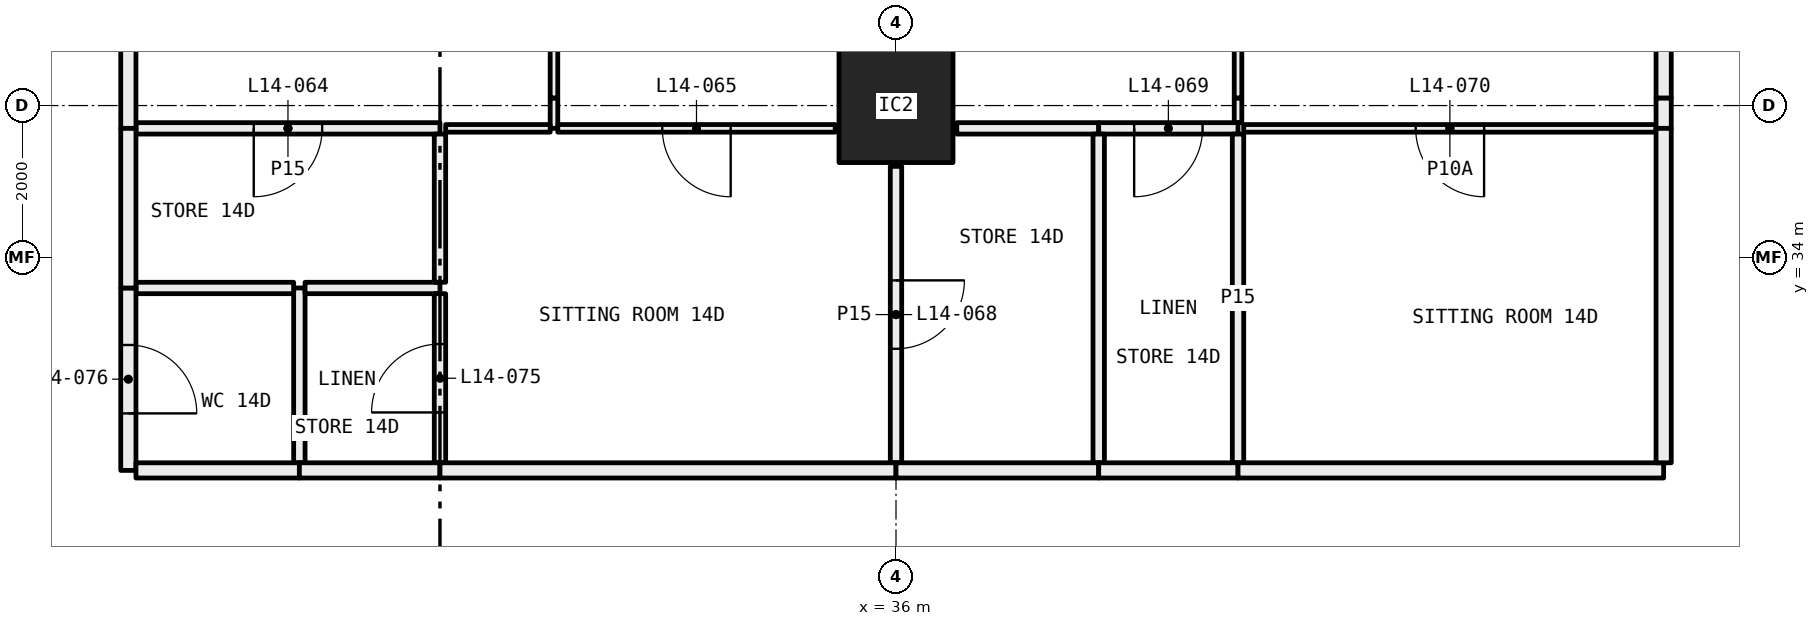
"""IFC4 building model, lengths in metres.
Left out: names, types, materials, properties, quantities, classifications, styles, units other than length and angle.
Written with IfcOpenShell. Run it as: python <this file> out.ifc"""

import sys

from ifc_helpers import new_model, si_unit, direction, frame, frame_2d, origin, origin_2d, place, context, subcontext, project, spatial, rectangle, hollow_rectangle, extrude, element, fill, save


model = new_model("IFC4")
c1 = context("Model", 3, precision=1e-05, world=origin(), true_north=direction((0.0, 1.0)))
c2 = subcontext(c1, "Body", "Model", "MODEL_VIEW")
j1 = project(units=[si_unit("LENGTHUNIT", "METRE"), si_unit("PLANEANGLEUNIT", "RADIAN")], contexts=[c1])
p1 = place(None, origin())
s1 = spatial("IfcSite", under=j1, at=p1, CompositionType="ELEMENT")
p2 = place(p1, origin())
s2 = spatial("IfcBuilding", under=s1, at=p2, CompositionType="ELEMENT")
p3 = place(p2, frame((0.0, 0.0, 61.05)))
s3 = spatial("IfcBuildingStorey", under=s2, at=p3, CompositionType="ELEMENT", Elevation=61.05)
p4 = place(p3, frame((36.0, 36.0, 0.0), z_axis=(0.0, 0.0, 1.0), x_axis=(1.0, 0.0, 0.0)))
e1 = element("IfcColumn", 1, at=p4, inside=s3, PredefinedType="COLUMN", context=c2, shape_type="SweptSolid", body=[
    extrude(hollow_rectangle(XDim=1.5, YDim=1.5, WallThickness=0.065, at=origin_2d()), origin(), (0.0, 0.0, 1.0), 3.05),
])
p5 = place(p3, frame((31.5, 35.7, 0.0), z_axis=(0.0, 0.0, 1.0), x_axis=(0.0, 1.0, 0.0)))
e2 = element("IfcWall", 2, at=p5, inside=s3, PredefinedType="PARTITIONING", context=c2, shape_type="SweptSolid", body=[
    extrude(rectangle(XDim=0.4, YDim=0.1, at=frame_2d((0.2, 0.0))), origin(), (0.0, 0.0, 1.0), 2.45),
])
p6 = place(p3, frame((31.5, 36.1, 0.0), z_axis=(0.0, 0.0, 1.0), x_axis=(0.0, 1.0, 0.0)))
e3 = element("IfcWall", 3, at=p6, inside=s3, PredefinedType="PARTITIONING", context=c2, shape_type="SweptSolid", body=[
    extrude(rectangle(XDim=5.825, YDim=0.1, at=frame_2d((2.913, 0.0))), origin(), (0.0, 0.0, 1.0), 3.05),
])
p7 = place(p6, frame((2.462, 0.0, 0.0)))
e4 = element("IfcOpeningElement", 4, at=p7, cuts=e3, PredefinedType="OPENING", context=c2, shape_type="SweptSolid", body=[
    extrude(rectangle(XDim=0.9, YDim=2.1, at=frame_2d((0.45, 1.05))), frame((0.0, 0.06, 0.0), z_axis=(0.0, -1.0, 0.0), x_axis=(1.0, 0.0, 0.0)), (0.0, 0.0, 1.0), 0.12),
])
p8 = place(p3, frame((26.0, 35.7, 0.0), z_axis=(0.0, 0.0, 1.0), x_axis=(1.0, 0.0, 0.0)))
e5 = element("IfcWall", 5, at=p8, inside=s3, PredefinedType="PARTITIONING", context=c2, shape_type="SweptSolid", body=[
    extrude(rectangle(XDim=4.0, YDim=0.15, at=frame_2d((2.0, 0.0))), origin(), (0.0, 0.0, 1.0), 3.05),
])
p9 = place(p8, frame((1.55, 0.0, 0.0)))
e6 = element("IfcOpeningElement", 6, at=p9, cuts=e5, PredefinedType="OPENING", context=c2, shape_type="SweptSolid", body=[
    extrude(rectangle(XDim=0.9, YDim=2.1, at=frame_2d((0.45, 1.05))), frame((0.0, 0.085, 0.0), z_axis=(0.0, -1.0, 0.0), x_axis=(1.0, 0.0, 0.0)), (0.0, 0.0, 1.0), 0.17),
])
p10 = place(p3, frame((30.075, 35.7, 0.0), z_axis=(0.0, 0.0, 1.0), x_axis=(1.0, 0.0, 0.0)))
e7 = element("IfcWall", 7, at=p10, inside=s3, PredefinedType="PARTITIONING", context=c2, shape_type="SweptSolid", body=[
    extrude(rectangle(XDim=1.375, YDim=0.1, at=frame_2d((0.688, 0.0))), origin(), (0.0, 0.0, 1.0), 3.05),
])
p11 = place(p3, frame((25.9, 41.9, 0.0), z_axis=(0.0, 0.0, 1.0), x_axis=(0.0, -1.0, 0.0)))
e8 = element("IfcWall", 8, at=p11, inside=s3, PredefinedType="PARTITIONING", context=c2, shape_type="SweptSolid", body=[
    extrude(rectangle(XDim=6.2, YDim=0.2, at=frame_2d((3.1, 0.0))), origin(), (0.0, 0.0, 1.0), 2.45),
])
p12 = place(p3, frame((31.55, 35.7, 0.0), z_axis=(0.0, 0.0, 1.0), x_axis=(1.0, 0.0, 0.0)))
e9 = element("IfcWall", 9, at=p12, inside=s3, PredefinedType="PARTITIONING", context=c2, shape_type="SweptSolid", body=[
    extrude(rectangle(XDim=3.65, YDim=0.1, at=frame_2d((1.825, 0.0))), origin(), (0.0, 0.0, 1.0), 3.05),
])
p13 = place(p12, frame((1.375, 0.0, 0.0)))
e10 = element("IfcOpeningElement", 10, at=p13, cuts=e9, PredefinedType="OPENING", context=c2, shape_type="SweptSolid", body=[
    extrude(rectangle(XDim=0.9, YDim=2.1, at=frame_2d((0.45, 1.05))), frame((0.0, 0.06, 0.0), z_axis=(0.0, -1.0, 0.0), x_axis=(1.0, 0.0, 0.0)), (0.0, 0.0, 1.0), 0.12),
])
p14 = place(p3, frame((28.15, 31.3, 0.0), z_axis=(0.0, 0.0, 1.0), x_axis=(0.0, 1.0, 0.0)))
e11 = element("IfcWall", 11, at=p14, inside=s3, PredefinedType="PARTITIONING", context=c2, shape_type="SweptSolid", body=[
    extrude(rectangle(XDim=2.3, YDim=0.15, at=frame_2d((1.15, 0.0))), origin(), (0.0, 0.0, 1.0), 3.05),
])
p15 = place(p3, frame((28.075, 33.6, 0.0), z_axis=(0.0, 0.0, 1.0), x_axis=(-1.0, 0.0, 0.0)))
e12 = element("IfcWall", 12, at=p15, inside=s3, PredefinedType="PARTITIONING", context=c2, shape_type="SweptSolid", body=[
    extrude(rectangle(XDim=2.075, YDim=0.15, at=frame_2d((1.038, 0.0))), origin(), (0.0, 0.0, 1.0), 3.05),
])
p16 = place(p3, frame((25.9, 33.6, 0.0), z_axis=(0.0, 0.0, 1.0), x_axis=(0.0, -1.0, 0.0)))
e13 = element("IfcWall", 13, at=p16, inside=s3, PredefinedType="PARTITIONING", context=c2, shape_type="SweptSolid", body=[
    extrude(rectangle(XDim=2.4, YDim=0.2, at=frame_2d((1.2, 0.0))), origin(), (0.0, 0.0, 1.0), 3.05),
])
p17 = place(p16, frame((0.75, 0.0, 0.0)))
e14 = element("IfcOpeningElement", 14, at=p17, cuts=e13, PredefinedType="OPENING", context=c2, shape_type="SweptSolid", body=[
    extrude(rectangle(XDim=0.9, YDim=2.1, at=frame_2d((0.45, 1.05))), frame((0.0, 0.11, 0.0), z_axis=(0.0, -1.0, 0.0), x_axis=(1.0, 0.0, 0.0)), (0.0, 0.0, 1.0), 0.22),
])
p18 = place(p3, frame((26.0, 31.2, 0.0), z_axis=(0.0, 0.0, 1.0), x_axis=(1.0, 0.0, 0.0)))
e15 = element("IfcWall", 15, at=p18, inside=s3, PredefinedType="PARTITIONING", context=c2, shape_type="SweptSolid", body=[
    extrude(rectangle(XDim=2.15, YDim=0.2, at=frame_2d((1.075, 0.0))), origin(), (0.0, 0.0, 1.0), 3.05),
])
p19 = place(p3, frame((30.0, 33.6, 0.0), z_axis=(0.0, 0.0, 1.0), x_axis=(-1.0, 0.0, 0.0)))
e16 = element("IfcWall", 16, at=p19, inside=s3, PredefinedType="PARTITIONING", context=c2, shape_type="SweptSolid", body=[
    extrude(rectangle(XDim=1.775, YDim=0.15, at=frame_2d((0.887, 0.0))), origin(), (0.0, 0.0, 1.0), 3.05),
])
p20 = place(p3, frame((30.0, 31.3, 0.0), z_axis=(0.0, 0.0, 1.0), x_axis=(0.0, 1.0, 0.0)))
e17 = element("IfcWall", 17, at=p20, inside=s3, PredefinedType="PARTITIONING", context=c2, shape_type="SweptSolid", body=[
    extrude(rectangle(XDim=2.225, YDim=0.15, at=frame_2d((1.112, 0.0))), origin(), (0.0, 0.0, 1.0), 3.05),
])
p21 = place(p20, frame((0.663, 0.0, 0.0)))
e18 = element("IfcOpeningElement", 18, at=p21, cuts=e17, PredefinedType="OPENING", context=c2, shape_type="SweptSolid", body=[
    extrude(rectangle(XDim=0.9, YDim=2.1, at=frame_2d((0.45, 1.05))), frame((0.0, 0.085, 0.0), z_axis=(0.0, -1.0, 0.0), x_axis=(1.0, 0.0, 0.0)), (0.0, 0.0, 1.0), 0.17),
])
p22 = place(p3, frame((28.15, 31.2, 0.0), z_axis=(0.0, 0.0, 1.0), x_axis=(1.0, 0.0, 0.0)))
e19 = element("IfcWall", 19, at=p22, inside=s3, PredefinedType="PARTITIONING", context=c2, shape_type="SweptSolid", body=[
    extrude(rectangle(XDim=1.85, YDim=0.2, at=frame_2d((0.925, 0.0))), origin(), (0.0, 0.0, 1.0), 3.05),
])
p23 = place(p3, frame((30.0, 33.675, 0.0), z_axis=(0.0, 0.0, 1.0), x_axis=(0.0, 1.0, 0.0)))
e20 = element("IfcWall", 20, at=p23, inside=s3, PredefinedType="PARTITIONING", context=c2, shape_type="SweptSolid", body=[
    extrude(rectangle(XDim=1.95, YDim=0.15, at=frame_2d((0.975, 0.0))), origin(), (0.0, 0.0, 1.0), 3.05),
])
p24 = place(p3, frame((25.9, 35.7, 0.0), z_axis=(0.0, 0.0, 1.0), x_axis=(0.0, -1.0, 0.0)))
e21 = element("IfcWall", 21, at=p24, inside=s3, PredefinedType="PARTITIONING", context=c2, shape_type="SweptSolid", body=[
    extrude(rectangle(XDim=2.1, YDim=0.2, at=frame_2d((1.05, 0.0))), origin(), (0.0, 0.0, 1.0), 3.05),
])
p25 = place(p3, frame((36.0, 31.3, 0.0), z_axis=(0.0, 0.0, 1.0), x_axis=(0.0, 1.0, 0.0)))
e22 = element("IfcWall", 22, at=p25, inside=s3, PredefinedType="PARTITIONING", context=c2, shape_type="SweptSolid", body=[
    extrude(rectangle(XDim=3.9, YDim=0.15, at=frame_2d((1.95, 0.0))), origin(), (0.0, 0.0, 1.0), 2.45),
])
p26 = place(p25, frame((1.5, 0.0, 0.0)))
e23 = element("IfcOpeningElement", 23, at=p26, cuts=e22, PredefinedType="OPENING", context=c2, shape_type="SweptSolid", body=[
    extrude(rectangle(XDim=0.9, YDim=2.1, at=frame_2d((0.45, 1.05))), frame((0.0, 0.085, 0.0), z_axis=(0.0, -1.0, 0.0), x_axis=(1.0, 0.0, 0.0)), (0.0, 0.0, 1.0), 0.17),
])
p27 = place(p3, frame((30.0, 31.2, 0.0), z_axis=(0.0, 0.0, 1.0), x_axis=(1.0, 0.0, 0.0)))
e24 = element("IfcWall", 24, at=p27, inside=s3, PredefinedType="PARTITIONING", context=c2, shape_type="SweptSolid", body=[
    extrude(rectangle(XDim=6.0, YDim=0.2, at=frame_2d((3.0, 0.0))), origin(), (0.0, 0.0, 1.0), 2.45),
])
p28 = place(p3, frame((40.5, 35.775, 0.0), z_axis=(0.0, 0.0, 1.0), x_axis=(0.0, 1.0, 0.0)))
e25 = element("IfcWall", 25, at=p28, inside=s3, PredefinedType="PARTITIONING", context=c2, shape_type="SweptSolid", body=[
    extrude(rectangle(XDim=0.325, YDim=0.1, at=frame_2d((0.163, 0.0))), origin(), (0.0, 0.0, 1.0), 2.45),
])
p29 = place(p3, frame((40.5, 36.1, 0.0), z_axis=(0.0, 0.0, 1.0), x_axis=(0.0, 1.0, 0.0)))
e26 = element("IfcWall", 26, at=p29, inside=s3, PredefinedType="PARTITIONING", context=c2, shape_type="SweptSolid", body=[
    extrude(rectangle(XDim=5.85, YDim=0.1, at=frame_2d((2.925, 0.0))), origin(), (0.0, 0.0, 1.0), 3.05),
])
p30 = place(p29, frame((2.475, 0.0, 0.0)))
e27 = element("IfcOpeningElement", 27, at=p30, cuts=e26, PredefinedType="OPENING", context=c2, shape_type="SweptSolid", body=[
    extrude(rectangle(XDim=0.9, YDim=2.1, at=frame_2d((0.45, 1.05))), frame((0.0, 0.06, 0.0), z_axis=(0.0, -1.0, 0.0), x_axis=(1.0, 0.0, 0.0)), (0.0, 0.0, 1.0), 0.12),
])
p31 = place(p3, frame((36.8, 35.7, 0.0), z_axis=(0.0, 0.0, 1.0), x_axis=(1.0, 0.0, 0.0)))
e28 = element("IfcWall", 28, at=p31, inside=s3, PredefinedType="PARTITIONING", context=c2, shape_type="SweptSolid", body=[
    extrude(rectangle(XDim=1.867, YDim=0.15, at=frame_2d((0.934, 0.0))), origin(), (0.0, 0.0, 1.0), 3.05),
])
p32 = place(p3, frame((38.667, 35.7, 0.0), z_axis=(0.0, 0.0, 1.0), x_axis=(1.0, 0.0, 0.0)))
e29 = element("IfcWall", 29, at=p32, inside=s3, PredefinedType="PARTITIONING", context=c2, shape_type="SweptSolid", body=[
    extrude(rectangle(XDim=1.833, YDim=0.15, at=frame_2d((0.917, 0.0))), origin(), (0.0, 0.0, 1.0), 3.05),
])
p33 = place(p32, frame((0.467, 0.0, 0.0)))
e30 = element("IfcOpeningElement", 30, at=p33, cuts=e29, PredefinedType="OPENING", context=c2, shape_type="SweptSolid", body=[
    extrude(rectangle(XDim=0.9, YDim=2.1, at=frame_2d((0.45, 1.05))), frame((0.0, 0.085, 0.0), z_axis=(0.0, -1.0, 0.0), x_axis=(1.0, 0.0, 0.0)), (0.0, 0.0, 1.0), 0.17),
])
p34 = place(p3, frame((40.575, 35.7, 0.0), z_axis=(0.0, 0.0, 1.0), x_axis=(1.0, 0.0, 0.0)))
e31 = element("IfcWall", 31, at=p34, inside=s3, PredefinedType="PARTITIONING", context=c2, shape_type="SweptSolid", body=[
    extrude(rectangle(XDim=5.425, YDim=0.1, at=frame_2d((2.712, 0.0))), origin(), (0.0, 0.0, 1.0), 3.05),
])
p35 = place(p34, frame((2.262, 0.0, 0.0)))
e32 = element("IfcOpeningElement", 32, at=p35, cuts=e31, PredefinedType="OPENING", context=c2, shape_type="SweptSolid", body=[
    extrude(rectangle(XDim=0.9, YDim=2.1, at=frame_2d((0.45, 1.05))), frame((0.0, 0.06, 0.0), z_axis=(0.0, -1.0, 0.0), x_axis=(1.0, 0.0, 0.0)), (0.0, 0.0, 1.0), 0.12),
])
p36 = place(p3, frame((46.1, 35.7, 0.0), z_axis=(0.0, 0.0, 1.0), x_axis=(0.0, 1.0, 0.0)))
e33 = element("IfcWall", 33, at=p36, inside=s3, PredefinedType="PARTITIONING", context=c2, shape_type="SweptSolid", body=[
    extrude(rectangle(XDim=0.4, YDim=0.2, at=frame_2d((0.2, 0.0))), origin(), (0.0, 0.0, 1.0), 2.45),
])
p37 = place(p3, frame((46.1, 36.1, 0.0), z_axis=(0.0, 0.0, 1.0), x_axis=(0.0, 1.0, 0.0)))
e34 = element("IfcWall", 34, at=p37, inside=s3, PredefinedType="PARTITIONING", context=c2, shape_type="SweptSolid", body=[
    extrude(rectangle(XDim=5.8, YDim=0.2, at=frame_2d((2.9, 0.0))), origin(), (0.0, 0.0, 1.0), 3.05),
])
p38 = place(p3, frame((38.667, 31.3, 0.0), z_axis=(0.0, 0.0, 1.0), x_axis=(0.0, 1.0, 0.0)))
e35 = element("IfcWall", 35, at=p38, inside=s3, PredefinedType="PARTITIONING", context=c2, shape_type="SweptSolid", body=[
    extrude(rectangle(XDim=4.325, YDim=0.15, at=frame_2d((2.163, 0.0))), origin(), (0.0, 0.0, 1.0), 3.05),
])
p39 = place(p3, frame((36.0, 31.2, 0.0), z_axis=(0.0, 0.0, 1.0), x_axis=(1.0, 0.0, 0.0)))
e36 = element("IfcWall", 36, at=p39, inside=s3, PredefinedType="PARTITIONING", context=c2, shape_type="SweptSolid", body=[
    extrude(rectangle(XDim=2.667, YDim=0.2, at=frame_2d((1.333, 0.0))), origin(), (0.0, 0.0, 1.0), 2.45),
])
p40 = place(p3, frame((40.5, 31.3, 0.0), z_axis=(0.0, 0.0, 1.0), x_axis=(0.0, 1.0, 0.0)))
e37 = element("IfcWall", 37, at=p40, inside=s3, PredefinedType="PARTITIONING", context=c2, shape_type="SweptSolid", body=[
    extrude(rectangle(XDim=4.325, YDim=0.15, at=frame_2d((2.163, 0.0))), origin(), (0.0, 0.0, 1.0), 3.05),
])
p41 = place(p3, frame((38.667, 31.2, 0.0), z_axis=(0.0, 0.0, 1.0), x_axis=(1.0, 0.0, 0.0)))
e38 = element("IfcWall", 38, at=p41, inside=s3, PredefinedType="PARTITIONING", context=c2, shape_type="SweptSolid", body=[
    extrude(rectangle(XDim=1.833, YDim=0.2, at=frame_2d((0.917, 0.0))), origin(), (0.0, 0.0, 1.0), 3.05),
])
p42 = place(p3, frame((40.5, 31.2, 0.0), z_axis=(0.0, 0.0, 1.0), x_axis=(1.0, 0.0, 0.0)))
e39 = element("IfcWall", 39, at=p42, inside=s3, PredefinedType="PARTITIONING", context=c2, shape_type="SweptSolid", body=[
    extrude(rectangle(XDim=5.6, YDim=0.2, at=frame_2d((2.8, 0.0))), origin(), (0.0, 0.0, 1.0), 3.05),
])
p43 = place(p3, frame((46.1, 31.3, 0.0), z_axis=(0.0, 0.0, 1.0), x_axis=(0.0, 1.0, 0.0)))
e40 = element("IfcWall", 40, at=p43, inside=s3, PredefinedType="PARTITIONING", context=c2, shape_type="SweptSolid", body=[
    extrude(rectangle(XDim=4.4, YDim=0.2, at=frame_2d((2.2, 0.0))), origin(), (0.0, 0.0, 1.0), 3.05),
])
p44 = place(p9, frame((0.9, 0.0, 0.0), x_axis=(-1.0, 0.0, 0.0)))
e41 = element("IfcDoor", 41, at=p44, inside=s3, OperationType="SINGLE_SWING_LEFT", PredefinedType="DOOR", context=c2, shape_type="SweptSolid", body=[
    extrude(rectangle(XDim=0.9, YDim=2.1, at=frame_2d((0.45, 1.05))), frame((0.0, 0.025, 0.0), z_axis=(0.0, -1.0, 0.0), x_axis=(1.0, 0.0, 0.0)), (0.0, 0.0, 1.0), 0.05),
])
fill(e6, e41)
p45 = place(p13, frame((0.9, 0.0, 0.0), x_axis=(-1.0, 0.0, 0.0)))
e42 = element("IfcDoor", 42, at=p45, inside=s3, OperationType="SINGLE_SWING_RIGHT", PredefinedType="DOOR", context=c2, shape_type="SweptSolid", body=[
    extrude(rectangle(XDim=0.9, YDim=2.1, at=frame_2d((0.45, 1.05))), frame((0.0, 0.025, 0.0), z_axis=(0.0, -1.0, 0.0), x_axis=(1.0, 0.0, 0.0)), (0.0, 0.0, 1.0), 0.05),
])
fill(e10, e42)
p46 = place(p26, frame((0.9, 0.0, 0.0), x_axis=(-1.0, 0.0, 0.0)))
e43 = element("IfcDoor", 43, at=p46, inside=s3, OperationType="SINGLE_SWING_RIGHT", PredefinedType="DOOR", context=c2, shape_type="SweptSolid", body=[
    extrude(rectangle(XDim=0.9, YDim=2.1, at=frame_2d((0.45, 1.05))), frame((0.0, 0.025, 0.0), z_axis=(0.0, -1.0, 0.0), x_axis=(1.0, 0.0, 0.0)), (0.0, 0.0, 1.0), 0.05),
])
fill(e23, e43)
p47 = place(p33, frame((0.9, 0.0, 0.0), x_axis=(-1.0, 0.0, 0.0)))
e44 = element("IfcDoor", 44, at=p47, inside=s3, OperationType="SINGLE_SWING_LEFT", PredefinedType="DOOR", context=c2, shape_type="SweptSolid", body=[
    extrude(rectangle(XDim=0.9, YDim=2.1, at=frame_2d((0.45, 1.05))), frame((0.0, 0.025, 0.0), z_axis=(0.0, -1.0, 0.0), x_axis=(1.0, 0.0, 0.0)), (0.0, 0.0, 1.0), 0.05),
])
fill(e30, e44)
p48 = place(p35, frame((0.9, 0.0, 0.0), x_axis=(-1.0, 0.0, 0.0)))
e45 = element("IfcDoor", 45, at=p48, inside=s3, OperationType="SINGLE_SWING_RIGHT", PredefinedType="DOOR", context=c2, shape_type="SweptSolid", body=[
    extrude(rectangle(XDim=0.9, YDim=2.1, at=frame_2d((0.45, 1.05))), frame((0.0, 0.025, 0.0), z_axis=(0.0, -1.0, 0.0), x_axis=(1.0, 0.0, 0.0)), (0.0, 0.0, 1.0), 0.05),
])
fill(e32, e45)
p49 = place(p21, origin())
e46 = element("IfcDoor", 46, at=p49, inside=s3, OperationType="SINGLE_SWING_RIGHT", PredefinedType="DOOR", context=c2, shape_type="SweptSolid", body=[
    extrude(rectangle(XDim=0.9, YDim=2.1, at=frame_2d((0.45, 1.05))), frame((0.0, 0.025, 0.0), z_axis=(0.0, -1.0, 0.0), x_axis=(1.0, 0.0, 0.0)), (0.0, 0.0, 1.0), 0.05),
])
fill(e18, e46)
p50 = place(p17, origin())
e47 = element("IfcDoor", 47, at=p50, inside=s3, OperationType="SINGLE_SWING_LEFT", PredefinedType="DOOR", context=c2, shape_type="SweptSolid", body=[
    extrude(rectangle(XDim=0.9, YDim=2.1, at=frame_2d((0.45, 1.05))), frame((0.0, 0.025, 0.0), z_axis=(0.0, -1.0, 0.0), x_axis=(1.0, 0.0, 0.0)), (0.0, 0.0, 1.0), 0.05),
])
fill(e14, e47)
save(model, sys.argv[1])
